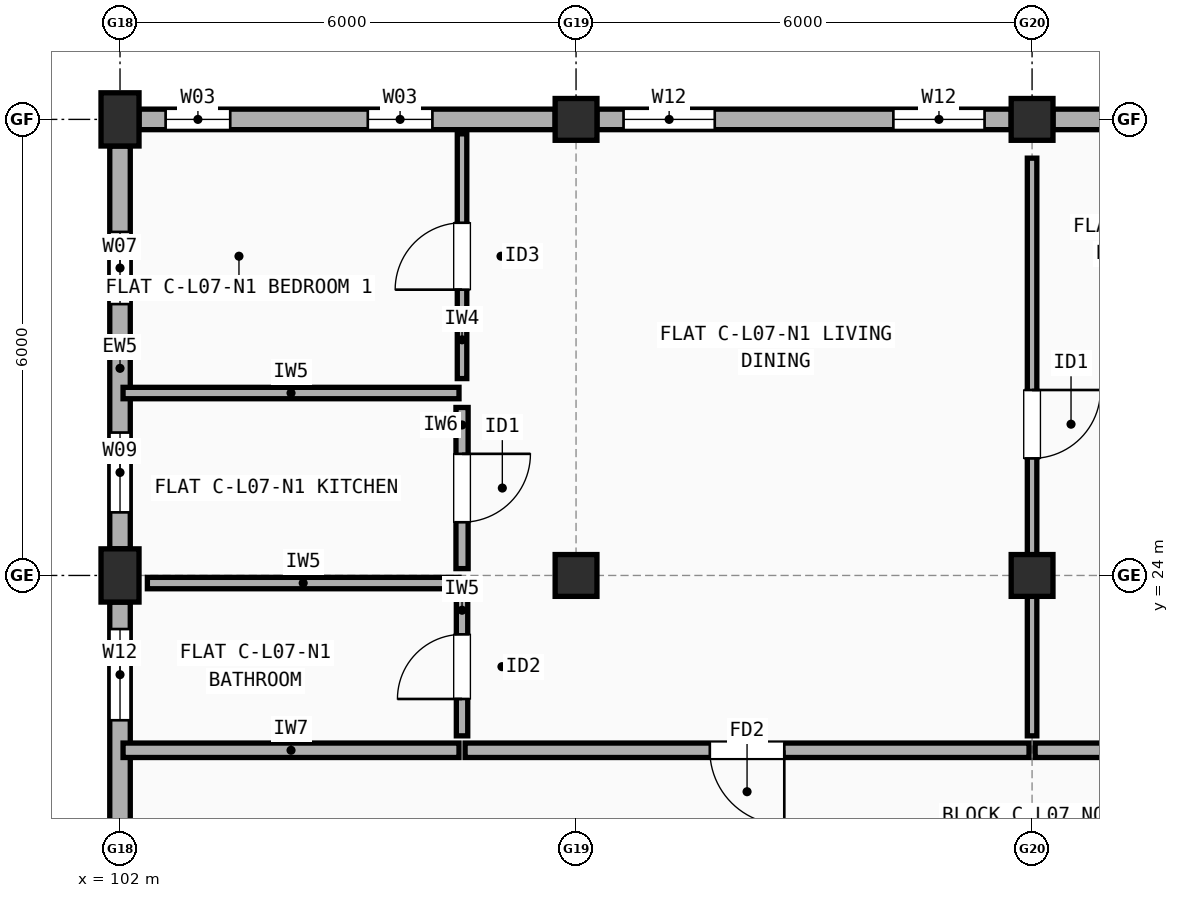
"""IFC4 building model, lengths in metres.
Left out: names, types, materials, properties, quantities, classifications, styles, units other than length and angle.
Written with IfcOpenShell. Run it as: python <this file> out.ifc"""

import sys

from ifc_helpers import new_model, si_unit, direction, frame, frame_2d, origin, origin_2d, place, context, subcontext, project, spatial, rectangle, extrude, element, fill, save


model = new_model("IFC4")
c1 = context("Model", 3, precision=1e-05, world=origin(), true_north=direction((0.0, 1.0)))
c2 = subcontext(c1, "Body", "Model", "MODEL_VIEW")
j1 = project(units=[si_unit("LENGTHUNIT", "METRE"), si_unit("PLANEANGLEUNIT", "RADIAN")], contexts=[c1])
p1 = place(None, origin())
s1 = spatial("IfcSite", under=j1, at=p1, CompositionType="ELEMENT")
p2 = place(p1, origin())
s2 = spatial("IfcBuilding", under=s1, at=p2, CompositionType="ELEMENT")
p3 = place(p2, frame((0.0, 0.0, 23.7)))
s3 = spatial("IfcBuildingStorey", under=s2, at=p3, CompositionType="ELEMENT", Elevation=23.7)
for number, where, z_axis, x_axis in (
    (1, (102.0, 24.0, 0.0), (0.0, 0.0, 1.0), (1.0, 0.0, 0.0)),
    (2, (102.0, 30.0, 0.0), (0.0, 0.0, 1.0), (1.0, 0.0, 0.0)),
):
    element("IfcColumn", number, at=place(p3, frame(where, z_axis=z_axis, x_axis=x_axis)), inside=s3, PredefinedType="COLUMN", context=c2, shape_type="SweptSolid", body=[
        extrude(rectangle(XDim=0.5, YDim=0.7, at=origin_2d()), origin(), (0.0, 0.0, 1.0), 2.975),
    ])
for number, where, z_axis, x_axis in (
    (3, (108.0, 24.0, 0.0), (0.0, 0.0, 1.0), (1.0, 0.0, 0.0)),
    (4, (108.0, 30.0, 0.0), (0.0, 0.0, 1.0), (1.0, 0.0, 0.0)),
    (5, (114.0, 24.0, 0.0), (0.0, 0.0, 1.0), (1.0, 0.0, 0.0)),
    (6, (114.0, 30.0, 0.0), (0.0, 0.0, 1.0), (1.0, 0.0, 0.0)),
):
    element("IfcColumn", number, at=place(p3, frame(where, z_axis=z_axis, x_axis=x_axis)), inside=s3, PredefinedType="COLUMN", context=c2, shape_type="SweptSolid", body=[
        extrude(rectangle(XDim=0.55, YDim=0.55, at=origin_2d()), origin(), (0.0, 0.0, 1.0), 2.975),
    ])
p4 = place(p3, frame((119.725, 30.0, 0.0), z_axis=(0.0, 0.0, 1.0), x_axis=(-1.0, 0.0, 0.0)))
e7 = element("IfcWall", 7, at=p4, inside=s3, PredefinedType="STANDARD", context=c2, shape_type="SweptSolid", body=[
    extrude(rectangle(XDim=5.45, YDim=0.27, at=frame_2d((2.725, 0.0))), origin(), (0.0, 0.0, 1.0), 2.457),
])
p5 = place(p4, frame((0.867, 0.0, 0.9)))
e8 = element("IfcOpeningElement", 8, at=p5, cuts=e7, PredefinedType="OPENING", context=c2, shape_type="SweptSolid", body=[
    extrude(rectangle(XDim=0.95, YDim=1.35, at=frame_2d((0.475, 0.675))), frame((0.0, 0.145, 0.0), z_axis=(0.0, -1.0, 0.0), x_axis=(1.0, 0.0, 0.0)), (0.0, 0.0, 1.0), 0.29),
])
p6 = place(p4, frame((3.583, 0.0, 0.9)))
e9 = element("IfcOpeningElement", 9, at=p6, cuts=e7, PredefinedType="OPENING", context=c2, shape_type="SweptSolid", body=[
    extrude(rectangle(XDim=1.05, YDim=1.35, at=frame_2d((0.525, 0.675))), frame((0.0, 0.145, 0.0), z_axis=(0.0, -1.0, 0.0), x_axis=(1.0, 0.0, 0.0)), (0.0, 0.0, 1.0), 0.29),
])
p7 = place(p3, frame((113.725, 30.0, 0.0), z_axis=(0.0, 0.0, 1.0), x_axis=(-1.0, 0.0, 0.0)))
e10 = element("IfcWall", 10, at=p7, inside=s3, PredefinedType="STANDARD", context=c2, shape_type="SweptSolid", body=[
    extrude(rectangle(XDim=5.45, YDim=0.27, at=frame_2d((2.725, 0.0))), origin(), (0.0, 0.0, 1.0), 2.457),
])
p8 = place(p7, frame((0.35, 0.0, 0.9)))
e11 = element("IfcOpeningElement", 11, at=p8, cuts=e10, PredefinedType="OPENING", context=c2, shape_type="SweptSolid", body=[
    extrude(rectangle(XDim=1.2, YDim=1.35, at=frame_2d((0.6, 0.675))), frame((0.0, 0.145, 0.0), z_axis=(0.0, -1.0, 0.0), x_axis=(1.0, 0.0, 0.0)), (0.0, 0.0, 1.0), 0.29),
])
p9 = place(p7, frame((3.9, 0.0, 0.9)))
e12 = element("IfcOpeningElement", 12, at=p9, cuts=e10, PredefinedType="OPENING", context=c2, shape_type="SweptSolid", body=[
    extrude(rectangle(XDim=1.2, YDim=1.35, at=frame_2d((0.6, 0.675))), frame((0.0, 0.145, 0.0), z_axis=(0.0, -1.0, 0.0), x_axis=(1.0, 0.0, 0.0)), (0.0, 0.0, 1.0), 0.29),
])
p10 = place(p3, frame((107.725, 30.0, 0.0), z_axis=(0.0, 0.0, 1.0), x_axis=(-1.0, 0.0, 0.0)))
e13 = element("IfcWall", 13, at=p10, inside=s3, PredefinedType="STANDARD", context=c2, shape_type="SweptSolid", body=[
    extrude(rectangle(XDim=5.475, YDim=0.27, at=frame_2d((2.738, 0.0))), origin(), (0.0, 0.0, 1.0), 2.457),
])
p11 = place(p10, frame((1.615, 0.0, 0.9)))
e14 = element("IfcOpeningElement", 14, at=p11, cuts=e13, PredefinedType="OPENING", context=c2, shape_type="SweptSolid", body=[
    extrude(rectangle(XDim=0.85, YDim=1.25, at=frame_2d((0.425, 0.625))), frame((0.0, 0.145, 0.0), z_axis=(0.0, -1.0, 0.0), x_axis=(1.0, 0.0, 0.0)), (0.0, 0.0, 1.0), 0.29),
])
p12 = place(p10, frame((4.275, 0.0, 0.9)))
e15 = element("IfcOpeningElement", 15, at=p12, cuts=e13, PredefinedType="OPENING", context=c2, shape_type="SweptSolid", body=[
    extrude(rectangle(XDim=0.85, YDim=1.25, at=frame_2d((0.425, 0.625))), frame((0.0, 0.145, 0.0), z_axis=(0.0, -1.0, 0.0), x_axis=(1.0, 0.0, 0.0)), (0.0, 0.0, 1.0), 0.29),
])
p13 = place(p3, frame((102.0, 29.65, 0.0), z_axis=(0.0, 0.0, 1.0), x_axis=(0.0, -1.0, 0.0)))
e16 = element("IfcWall", 16, at=p13, inside=s3, PredefinedType="STANDARD", context=c2, shape_type="SweptSolid", body=[
    extrude(rectangle(XDim=5.3, YDim=0.27, at=frame_2d((2.65, 0.0))), origin(), (0.0, 0.0, 1.0), 2.457),
])
p14 = place(p13, frame((1.13, 0.0, 0.9)))
e17 = element("IfcOpeningElement", 17, at=p14, cuts=e16, PredefinedType="OPENING", context=c2, shape_type="SweptSolid", body=[
    extrude(rectangle(XDim=0.95, YDim=1.35, at=frame_2d((0.475, 0.675))), frame((0.0, 0.145, 0.0), z_axis=(0.0, -1.0, 0.0), x_axis=(1.0, 0.0, 0.0)), (0.0, 0.0, 1.0), 0.29),
])
p15 = place(p13, frame((3.77, 0.0, 0.9)))
e18 = element("IfcOpeningElement", 18, at=p15, cuts=e16, PredefinedType="OPENING", context=c2, shape_type="SweptSolid", body=[
    extrude(rectangle(XDim=1.05, YDim=1.35, at=frame_2d((0.525, 0.675))), frame((0.0, 0.145, 0.0), z_axis=(0.0, -1.0, 0.0), x_axis=(1.0, 0.0, 0.0)), (0.0, 0.0, 1.0), 0.29),
])
p16 = place(p3, frame((102.0, 23.65, 0.0), z_axis=(0.0, 0.0, 1.0), x_axis=(0.0, -1.0, 0.0)))
e19 = element("IfcWall", 19, at=p16, inside=s3, PredefinedType="STANDARD", context=c2, shape_type="SweptSolid", body=[
    extrude(rectangle(XDim=5.3, YDim=0.27, at=frame_2d((2.65, 0.0))), origin(), (0.0, 0.0, 1.0), 2.457),
])
p17 = place(p16, frame((0.355, 0.0, 0.9)))
e20 = element("IfcOpeningElement", 20, at=p17, cuts=e19, PredefinedType="OPENING", context=c2, shape_type="SweptSolid", body=[
    extrude(rectangle(XDim=1.2, YDim=1.35, at=frame_2d((0.6, 0.675))), frame((0.0, 0.145, 0.0), z_axis=(0.0, -1.0, 0.0), x_axis=(1.0, 0.0, 0.0)), (0.0, 0.0, 1.0), 0.29),
])
p18 = place(p16, frame((3.245, 0.0, 0.9)))
e21 = element("IfcOpeningElement", 21, at=p18, cuts=e19, PredefinedType="OPENING", context=c2, shape_type="SweptSolid", body=[
    extrude(rectangle(XDim=0.8, YDim=1.2, at=frame_2d((0.4, 0.6))), frame((0.0, 0.145, 0.0), z_axis=(0.0, -1.0, 0.0), x_axis=(1.0, 0.0, 0.0)), (0.0, 0.0, 1.0), 0.29),
])
p19 = place(p3, frame((102.04, 21.7, 0.0), z_axis=(0.0, 0.0, 1.0), x_axis=(1.0, 0.0, 0.0)))
e22 = element("IfcWall", 22, at=p19, inside=s3, PredefinedType="SOLIDWALL", context=c2, shape_type="SweptSolid", body=[
    extrude(rectangle(XDim=4.42, YDim=0.19, at=frame_2d((2.21, 0.0))), origin(), (0.0, 0.0, 1.0), 2.457),
])
p20 = place(p3, frame((106.54, 21.7, 0.0), z_axis=(0.0, 0.0, 1.0), x_axis=(1.0, 0.0, 0.0)))
e23 = element("IfcWall", 23, at=p20, inside=s3, PredefinedType="SOLIDWALL", context=c2, shape_type="SweptSolid", body=[
    extrude(rectangle(XDim=7.42, YDim=0.19, at=frame_2d((3.71, 0.0))), origin(), (0.0, 0.0, 1.0), 2.508),
])
p21 = place(p20, frame((3.22, 0.0, 0.0)))
e24 = element("IfcOpeningElement", 24, at=p21, cuts=e23, PredefinedType="OPENING", context=c2, shape_type="SweptSolid", body=[
    extrude(rectangle(XDim=0.98, YDim=2.15, at=frame_2d((0.49, 1.075))), frame((0.0, 0.105, 0.0), z_axis=(0.0, -1.0, 0.0), x_axis=(1.0, 0.0, 0.0)), (0.0, 0.0, 1.0), 0.21),
])
p22 = place(p3, frame((106.5, 26.59, 0.0), z_axis=(0.0, 0.0, 1.0), x_axis=(0.0, 1.0, 0.0)))
e25 = element("IfcWall", 25, at=p22, inside=s3, PredefinedType="PARTITIONING", context=c2, shape_type="SweptSolid", body=[
    extrude(rectangle(XDim=3.22, YDim=0.125, at=frame_2d((1.61, 0.0))), origin(), (0.0, 0.0, 1.0), 2.975),
])
p23 = place(p22, frame((1.17, 0.0, 0.0)))
e26 = element("IfcOpeningElement", 26, at=p23, cuts=e25, PredefinedType="OPENING", context=c2, shape_type="SweptSolid", body=[
    extrude(rectangle(XDim=0.88, YDim=2.1, at=frame_2d((0.44, 1.05))), frame((0.0, 0.073, 0.0), z_axis=(0.0, -1.0, 0.0), x_axis=(1.0, 0.0, 0.0)), (0.0, 0.0, 1.0), 0.145),
])
p24 = place(p3, frame((106.5, 24.09, 0.0), z_axis=(0.0, 0.0, 1.0), x_axis=(0.0, 1.0, 0.0)))
e27 = element("IfcWall", 27, at=p24, inside=s3, PredefinedType="PLUMBINGWALL", context=c2, shape_type="SweptSolid", body=[
    extrude(rectangle(XDim=2.12, YDim=0.16, at=frame_2d((1.06, 0.0))), origin(), (0.0, 0.0, 1.0), 2.408),
])
p25 = place(p24, frame((0.61, 0.0, 0.0)))
e28 = element("IfcOpeningElement", 28, at=p25, cuts=e27, PredefinedType="OPENING", context=c2, shape_type="SweptSolid", body=[
    extrude(rectangle(XDim=0.9, YDim=2.1, at=frame_2d((0.45, 1.05))), frame((0.0, 0.09, 0.0), z_axis=(0.0, -1.0, 0.0), x_axis=(1.0, 0.0, 0.0)), (0.0, 0.0, 1.0), 0.18),
])
p26 = place(p3, frame((106.5, 21.89, 0.0), z_axis=(0.0, 0.0, 1.0), x_axis=(0.0, 1.0, 0.0)))
e29 = element("IfcWall", 29, at=p26, inside=s3, PredefinedType="PARTITIONING", context=c2, shape_type="SweptSolid", body=[
    extrude(rectangle(XDim=1.82, YDim=0.15, at=frame_2d((0.91, 0.0))), origin(), (0.0, 0.0, 1.0), 2.975),
])
p27 = place(p26, frame((0.485, 0.0, 0.0)))
e30 = element("IfcOpeningElement", 30, at=p27, cuts=e29, PredefinedType="OPENING", context=c2, shape_type="SweptSolid", body=[
    extrude(rectangle(XDim=0.85, YDim=2.1, at=frame_2d((0.425, 1.05))), frame((0.0, 0.085, 0.0), z_axis=(0.0, -1.0, 0.0), x_axis=(1.0, 0.0, 0.0)), (0.0, 0.0, 1.0), 0.17),
])
p28 = place(p3, frame((102.04, 26.4, 0.0), z_axis=(0.0, 0.0, 1.0), x_axis=(1.0, 0.0, 0.0)))
e31 = element("IfcWall", 31, at=p28, inside=s3, PredefinedType="PARTITIONING", context=c2, shape_type="SweptSolid", body=[
    extrude(rectangle(XDim=4.42, YDim=0.15, at=frame_2d((2.21, 0.0))), origin(), (0.0, 0.0, 1.0), 2.457),
])
p29 = place(p3, frame((102.36, 23.9, 0.0), z_axis=(0.0, 0.0, 1.0), x_axis=(1.0, 0.0, 0.0)))
e32 = element("IfcWall", 32, at=p29, inside=s3, PredefinedType="PARTITIONING", context=c2, shape_type="SweptSolid", body=[
    extrude(rectangle(XDim=4.1, YDim=0.15, at=frame_2d((2.05, 0.0))), origin(), (0.0, 0.0, 1.0), 2.408),
])
p30 = place(p3, frame((114.04, 21.7, 0.0), z_axis=(0.0, 0.0, 1.0), x_axis=(1.0, 0.0, 0.0)))
e33 = element("IfcWall", 33, at=p30, inside=s3, PredefinedType="SOLIDWALL", context=c2, shape_type="SweptSolid", body=[
    extrude(rectangle(XDim=2.92, YDim=0.19, at=frame_2d((1.46, 0.0))), origin(), (0.0, 0.0, 1.0), 2.508),
])
p31 = place(p3, frame((114.0, 21.89, 0.0), z_axis=(0.0, 0.0, 1.0), x_axis=(0.0, 1.0, 0.0)))
e34 = element("IfcWall", 34, at=p31, inside=s3, PredefinedType="PARTITIONING", context=c2, shape_type="SweptSolid", body=[
    extrude(rectangle(XDim=7.6, YDim=0.125, at=frame_2d((3.8, 0.0))), origin(), (0.0, 0.0, 1.0), 2.508),
])
p32 = place(p31, frame((3.65, 0.0, 0.0)))
e35 = element("IfcOpeningElement", 35, at=p32, cuts=e34, PredefinedType="OPENING", context=c2, shape_type="SweptSolid", body=[
    extrude(rectangle(XDim=0.9, YDim=2.1, at=frame_2d((0.45, 1.05))), frame((0.0, 0.073, 0.0), z_axis=(0.0, -1.0, 0.0), x_axis=(1.0, 0.0, 0.0)), (0.0, 0.0, 1.0), 0.145),
])
p33 = place(p8, origin())
e36 = element("IfcWindow", 36, at=p33, inside=s3, PartitioningType="SINGLE_PANEL", PredefinedType="WINDOW", context=c2, shape_type="SweptSolid", body=[
    extrude(rectangle(XDim=1.2, YDim=1.35, at=frame_2d((0.6, 0.675))), frame((0.0, 0.03, 0.0), z_axis=(0.0, -1.0, 0.0), x_axis=(1.0, 0.0, 0.0)), (0.0, 0.0, 1.0), 0.06),
])
fill(e11, e36)
p34 = place(p9, origin())
e37 = element("IfcWindow", 37, at=p34, inside=s3, PartitioningType="SINGLE_PANEL", PredefinedType="WINDOW", context=c2, shape_type="SweptSolid", body=[
    extrude(rectangle(XDim=1.2, YDim=1.35, at=frame_2d((0.6, 0.675))), frame((0.0, 0.03, 0.0), z_axis=(0.0, -1.0, 0.0), x_axis=(1.0, 0.0, 0.0)), (0.0, 0.0, 1.0), 0.06),
])
fill(e12, e37)
p35 = place(p11, origin())
e38 = element("IfcWindow", 38, at=p35, inside=s3, PartitioningType="SINGLE_PANEL", PredefinedType="WINDOW", context=c2, shape_type="SweptSolid", body=[
    extrude(rectangle(XDim=0.85, YDim=1.25, at=frame_2d((0.425, 0.625))), frame((0.0, 0.03, 0.0), z_axis=(0.0, -1.0, 0.0), x_axis=(1.0, 0.0, 0.0)), (0.0, 0.0, 1.0), 0.06),
])
fill(e14, e38)
p36 = place(p12, origin())
e39 = element("IfcWindow", 39, at=p36, inside=s3, PartitioningType="SINGLE_PANEL", PredefinedType="WINDOW", context=c2, shape_type="SweptSolid", body=[
    extrude(rectangle(XDim=0.85, YDim=1.25, at=frame_2d((0.425, 0.625))), frame((0.0, 0.03, 0.0), z_axis=(0.0, -1.0, 0.0), x_axis=(1.0, 0.0, 0.0)), (0.0, 0.0, 1.0), 0.06),
])
fill(e15, e39)
p37 = place(p14, origin())
e40 = element("IfcWindow", 40, at=p37, inside=s3, PartitioningType="SINGLE_PANEL", PredefinedType="WINDOW", context=c2, shape_type="SweptSolid", body=[
    extrude(rectangle(XDim=0.95, YDim=1.35, at=frame_2d((0.475, 0.675))), frame((0.0, 0.03, 0.0), z_axis=(0.0, -1.0, 0.0), x_axis=(1.0, 0.0, 0.0)), (0.0, 0.0, 1.0), 0.06),
])
fill(e17, e40)
p38 = place(p15, origin())
e41 = element("IfcWindow", 41, at=p38, inside=s3, PartitioningType="SINGLE_PANEL", PredefinedType="WINDOW", context=c2, shape_type="SweptSolid", body=[
    extrude(rectangle(XDim=1.05, YDim=1.35, at=frame_2d((0.525, 0.675))), frame((0.0, 0.03, 0.0), z_axis=(0.0, -1.0, 0.0), x_axis=(1.0, 0.0, 0.0)), (0.0, 0.0, 1.0), 0.06),
])
fill(e18, e41)
p39 = place(p17, origin())
e42 = element("IfcWindow", 42, at=p39, inside=s3, PartitioningType="SINGLE_PANEL", PredefinedType="WINDOW", context=c2, shape_type="SweptSolid", body=[
    extrude(rectangle(XDim=1.2, YDim=1.35, at=frame_2d((0.6, 0.675))), frame((0.0, 0.03, 0.0), z_axis=(0.0, -1.0, 0.0), x_axis=(1.0, 0.0, 0.0)), (0.0, 0.0, 1.0), 0.06),
])
fill(e20, e42)
p40 = place(p21, origin())
e43 = element("IfcDoor", 43, at=p40, inside=s3, OperationType="SINGLE_SWING_RIGHT", PredefinedType="DOOR", context=c2, shape_type="SweptSolid", body=[
    extrude(rectangle(XDim=0.98, YDim=2.15, at=frame_2d((0.49, 1.075))), frame((0.0, 0.025, 0.0), z_axis=(0.0, -1.0, 0.0), x_axis=(1.0, 0.0, 0.0)), (0.0, 0.0, 1.0), 0.05),
])
fill(e24, e43)
p41 = place(p23, origin())
e44 = element("IfcDoor", 44, at=p41, inside=s3, OperationType="SINGLE_SWING_LEFT", PredefinedType="DOOR", context=c2, shape_type="SweptSolid", body=[
    extrude(rectangle(XDim=0.88, YDim=2.1, at=frame_2d((0.44, 1.05))), frame((0.0, 0.025, 0.0), z_axis=(0.0, -1.0, 0.0), x_axis=(1.0, 0.0, 0.0)), (0.0, 0.0, 1.0), 0.05),
])
fill(e26, e44)
p42 = place(p25, origin())
e45 = element("IfcDoor", 45, at=p42, inside=s3, OperationType="SINGLE_SWING_RIGHT", PredefinedType="DOOR", context=c2, shape_type="SweptSolid", body=[
    extrude(rectangle(XDim=0.9, YDim=2.1, at=frame_2d((0.45, 1.05))), frame((0.0, 0.025, 0.0), z_axis=(0.0, -1.0, 0.0), x_axis=(1.0, 0.0, 0.0)), (0.0, 0.0, 1.0), 0.05),
])
fill(e28, e45)
p43 = place(p27, origin())
e46 = element("IfcDoor", 46, at=p43, inside=s3, OperationType="SINGLE_SWING_LEFT", PredefinedType="DOOR", context=c2, shape_type="SweptSolid", body=[
    extrude(rectangle(XDim=0.85, YDim=2.1, at=frame_2d((0.425, 1.05))), frame((0.0, 0.025, 0.0), z_axis=(0.0, -1.0, 0.0), x_axis=(1.0, 0.0, 0.0)), (0.0, 0.0, 1.0), 0.05),
])
fill(e30, e46)
p44 = place(p32, origin())
e47 = element("IfcDoor", 47, at=p44, inside=s3, OperationType="SINGLE_SWING_RIGHT", PredefinedType="DOOR", context=c2, shape_type="SweptSolid", body=[
    extrude(rectangle(XDim=0.9, YDim=2.1, at=frame_2d((0.45, 1.05))), frame((0.0, 0.025, 0.0), z_axis=(0.0, -1.0, 0.0), x_axis=(1.0, 0.0, 0.0)), (0.0, 0.0, 1.0), 0.05),
])
fill(e35, e47)
save(model, sys.argv[1])
